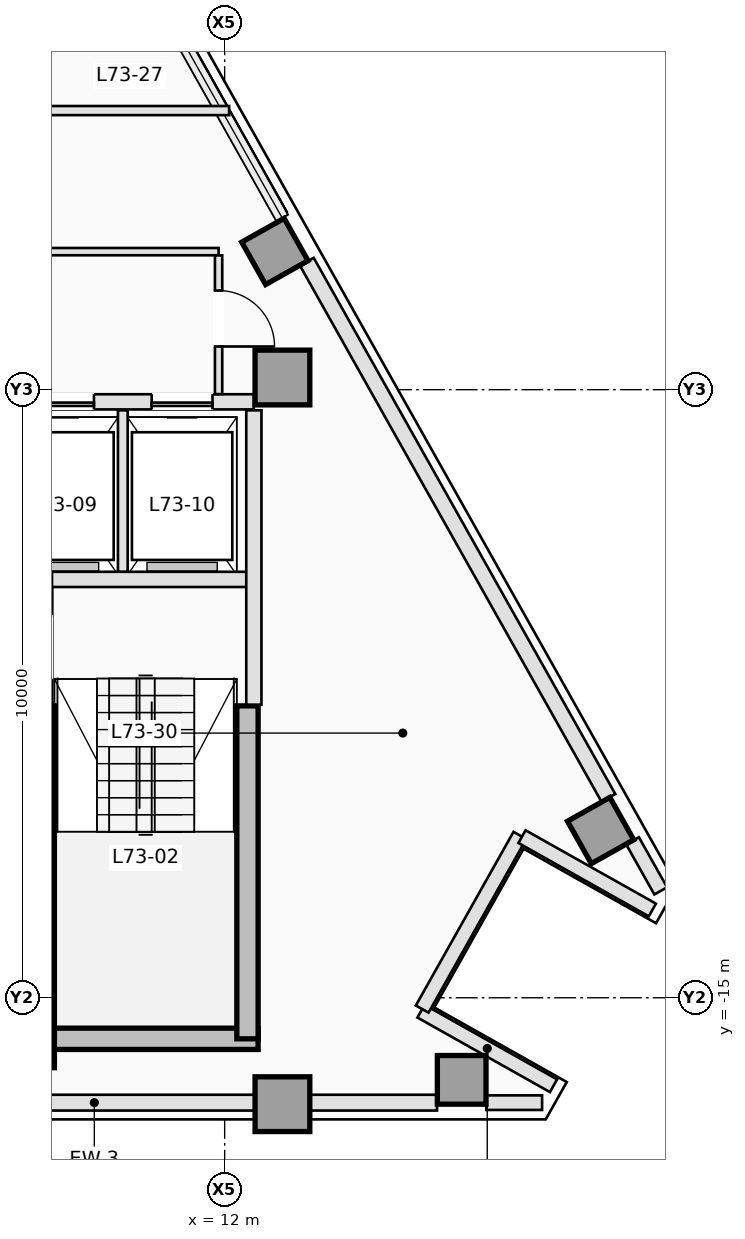
"""IFC4 building model, lengths in metres.
Left out: names, types, materials, properties, quantities, classifications, styles, units other than length and angle.
Written with IfcOpenShell. Run it as: python <this file> out.ifc"""

import sys

from ifc_helpers import new_model, si_unit, direction, frame, frame_2d, origin, origin_2d, place, context, subcontext, project, spatial, rectangle, extrude, element, fill, save


model = new_model("IFC4")
c1 = context("Model", 3, precision=1e-05, world=origin(), true_north=direction((0.0, 1.0)))
c2 = subcontext(c1, "Body", "Model", "MODEL_VIEW")
j1 = project(units=[si_unit("LENGTHUNIT", "METRE"), si_unit("PLANEANGLEUNIT", "RADIAN")], contexts=[c1])
p1 = place(None, origin())
s1 = spatial("IfcSite", under=j1, at=p1, CompositionType="ELEMENT")
p2 = place(p1, origin())
s2 = spatial("IfcBuilding", under=s1, at=p2, CompositionType="ELEMENT")
p3 = place(p2, frame((0.0, 0.0, 263.9)))
s3 = spatial("IfcBuildingStorey", under=s2, at=p3, CompositionType="ELEMENT", Elevation=263.9)
p4 = place(p3, frame((8.85, -15.675, 0.0), z_axis=(0.0, 0.0, 1.0), x_axis=(1.0, 0.0, 0.0)))
e1 = element("IfcWall", 1, at=p4, inside=s3, PredefinedType="SHEAR", context=c2, shape_type="SweptSolid", body=[
    extrude(rectangle(XDim=3.7, YDim=0.35, at=frame_2d((1.85, 0.0))), origin(), (0.0, 0.0, 1.0), 3.5),
])
p5 = place(p3, frame((12.375, -15.675, 0.0), z_axis=(0.0, 0.0, 1.0), x_axis=(0.0, 1.0, 0.0)))
e2 = element("IfcWall", 2, at=p5, inside=s3, PredefinedType="SHEAR", context=c2, shape_type="SweptSolid", body=[
    extrude(rectangle(XDim=5.475, YDim=0.35, at=frame_2d((2.738, 0.0))), origin(), (0.0, 0.0, 1.0), 3.5),
])
p6 = place(p3, frame((9.025, -16.15, 0.0), z_axis=(0.0, 0.0, 1.0), x_axis=(0.0, 1.0, 0.0)))
e3 = element("IfcWall", 3, at=p6, inside=s3, PredefinedType="SHEAR", context=c2, shape_type="SweptSolid", body=[
    extrude(rectangle(XDim=5.95, YDim=0.35, at=frame_2d((2.975, 0.0))), origin(), (0.0, 0.0, 1.0), 3.5),
])
for number, where, z_axis, x_axis in (
    (4, (12.95, -16.75, 0.0), (0.0, 0.0, 1.0), (1.0, 0.0, 0.0)),
    (5, (12.95, -4.8, 0.0), (0.0, 0.0, 1.0), (1.0, 0.0, 0.0)),
):
    element("IfcColumn", number, at=place(p3, frame(where, z_axis=z_axis, x_axis=x_axis)), inside=s3, PredefinedType="COLUMN", context=c2, shape_type="SweptSolid", body=[
        extrude(rectangle(XDim=0.9, YDim=0.9, at=origin_2d()), origin(), (0.0, 0.0, 1.0), 3.5),
    ])
for number, where, z_axis, x_axis in (
    (6, (15.898, -16.35, 0.0), (0.0, 0.0, 1.0), (0.0, 1.0, 0.0)),
    (7, (18.182, -12.25, 0.0), (0.0, 0.0, 1.0), (0.872, 0.49, 0.0)),
    (8, (12.825, -2.727, 0.0), (0.0, 0.0, 1.0), (0.872, 0.49, 0.0)),
):
    element("IfcColumn", number, at=place(p3, frame(where, z_axis=z_axis, x_axis=x_axis)), inside=s3, PredefinedType="COLUMN", context=c2, shape_type="SweptSolid", body=[
        extrude(rectangle(XDim=0.8, YDim=0.8, at=origin_2d()), origin(), (0.0, 0.0, 1.0), 3.5),
    ])
p7 = place(p3, frame((17.22, -16.725, 0.0), z_axis=(0.0, 0.0, 1.0), x_axis=(-1.0, 0.0, 0.0)))
e9 = element("IfcWall", 9, at=p7, inside=s3, PredefinedType="STANDARD", context=c2, shape_type="SweptSolid", body=[
    extrude(rectangle(XDim=0.917, YDim=0.24, at=frame_2d((0.459, 0.0))), origin(), (0.0, 0.0, 1.0), 3.25),
])
p8 = place(p3, frame((15.493, -16.725, 0.0), z_axis=(0.0, 0.0, 1.0), x_axis=(-1.0, 0.0, 0.0)))
e10 = element("IfcWall", 10, at=p8, inside=s3, PredefinedType="STANDARD", context=c2, shape_type="SweptSolid", body=[
    extrude(rectangle(XDim=11.273, YDim=0.26, at=frame_2d((5.636, 0.0))), origin(), (0.0, 0.0, 1.0), 2.79),
])
p9 = place(p3, frame((18.708, -12.419, 0.0), z_axis=(0.0, 0.0, 1.0), x_axis=(0.490199895283, -0.871610040479, 0.0)))
e11 = element("IfcWall", 11, at=p9, inside=s3, PredefinedType="STANDARD", context=c2, shape_type="SweptSolid", body=[
    extrude(rectangle(XDim=0.945, YDim=0.24, at=frame_2d((0.472, 0.0))), origin(), (0.0, 0.0, 1.0), 3.25),
])
p10 = place(p3, frame((13.351, -2.896, 0.0), z_axis=(0.0, 0.0, 1.0), x_axis=(0.490266968583, -0.871572314565, 0.0)))
e12 = element("IfcWall", 12, at=p10, inside=s3, PredefinedType="STANDARD", context=c2, shape_type="SweptSolid", body=[
    extrude(rectangle(XDim=10.116, YDim=0.26, at=frame_2d((5.058, 0.0))), origin(), (0.0, 0.0, 1.0), 3.25),
])
p11 = place(p3, frame((17.408, -16.447, 0.0), z_axis=(0.0, 0.0, 1.0), x_axis=(-0.871588577066, 0.490238056792, 0.0)))
e13 = element("IfcWall", 13, at=p11, inside=s3, PredefinedType="STANDARD", context=c2, shape_type="SweptSolid", body=[
    extrude(rectangle(XDim=2.5, YDim=0.24, at=frame_2d((1.25, 0.0))), origin(), (0.0, 0.0, 1.0), 3.25),
])
p12 = place(p3, frame((15.248, -15.186, 0.0), z_axis=(0.0, 0.0, 1.0), x_axis=(0.490293083368, 0.871557624258, 0.0)))
e14 = element("IfcWall", 14, at=p12, inside=s3, PredefinedType="STANDARD", context=c2, shape_type="SweptSolid", body=[
    extrude(rectangle(XDim=3.276, YDim=0.24, at=frame_2d((1.638, 0.0))), origin(), (0.0, 0.0, 1.0), 2.79),
])
p13 = place(p3, frame((16.889, -12.35, 0.0), z_axis=(0.0, 0.0, 1.0), x_axis=(0.87157023615, -0.490270663468, 0.0)))
e15 = element("IfcWall", 15, at=p13, inside=s3, PredefinedType="STANDARD", context=c2, shape_type="SweptSolid", body=[
    extrude(rectangle(XDim=2.46, YDim=0.24, at=frame_2d((1.23, 0.0))), origin(), (0.0, 0.0, 1.0), 3.25),
])
p14 = place(p3, frame((9.16, -8.12, 0.0), z_axis=(0.0, 0.0, 1.0), x_axis=(1.0, 0.0, 0.0)))
e16 = element("IfcWall", 16, at=p14, inside=s3, PredefinedType="PARTITIONING", context=c2, shape_type="SweptSolid", body=[
    extrude(rectangle(XDim=3.22, YDim=0.25, at=frame_2d((1.61, 0.0))), origin(), (0.0, 0.0, 1.0), 3.25),
])
p15 = place(p3, frame((12.48, -10.18, 0.0), z_axis=(0.0, 0.0, 1.0), x_axis=(0.0, 1.0, 0.0)))
e17 = element("IfcWall", 17, at=p15, inside=s3, PredefinedType="PARTITIONING", context=c2, shape_type="SweptSolid", body=[
    extrude(rectangle(XDim=4.84, YDim=0.25, at=frame_2d((2.42, 0.0))), origin(), (0.0, 0.0, 1.0), 3.25),
])
p16 = place(p3, frame((4.202, -5.2, 0.0), z_axis=(0.0, 0.0, 1.0), x_axis=(1.0, 0.0, 0.0)))
e18 = element("IfcWall", 18, at=p16, inside=s3, PredefinedType="PARTITIONING", context=c2, shape_type="SweptSolid", body=[
    extrude(rectangle(XDim=8.278, YDim=0.25, at=frame_2d((4.139, 0.0))), origin(), (0.0, 0.0, 1.0), 3.25),
])
p17 = place(p16, frame((0.748, 0.0, 0.0)))
e19 = element("IfcOpeningElement", 19, at=p17, cuts=e18, PredefinedType="OPENING", context=c2, shape_type="SweptSolid", body=[
    extrude(rectangle(XDim=1.0, YDim=2.15, at=frame_2d((0.5, 1.075))), frame((0.0, 0.135, 0.0), z_axis=(0.0, -1.0, 0.0), x_axis=(1.0, 0.0, 0.0)), (0.0, 0.0, 1.0), 0.27),
])
p18 = place(p16, frame((2.698, 0.0, 0.0)))
e20 = element("IfcOpeningElement", 20, at=p18, cuts=e18, PredefinedType="OPENING", context=c2, shape_type="SweptSolid", body=[
    extrude(rectangle(XDim=1.0, YDim=2.15, at=frame_2d((0.5, 1.075))), frame((0.0, 0.135, 0.0), z_axis=(0.0, -1.0, 0.0), x_axis=(1.0, 0.0, 0.0)), (0.0, 0.0, 1.0), 0.27),
])
p19 = place(p16, frame((4.648, 0.0, 0.0)))
e21 = element("IfcOpeningElement", 21, at=p19, cuts=e18, PredefinedType="OPENING", context=c2, shape_type="SweptSolid", body=[
    extrude(rectangle(XDim=1.0, YDim=2.15, at=frame_2d((0.5, 1.075))), frame((0.0, 0.135, 0.0), z_axis=(0.0, -1.0, 0.0), x_axis=(1.0, 0.0, 0.0)), (0.0, 0.0, 1.0), 0.27),
])
p20 = place(p16, frame((6.598, 0.0, 0.0)))
e22 = element("IfcOpeningElement", 22, at=p20, cuts=e18, PredefinedType="OPENING", context=c2, shape_type="SweptSolid", body=[
    extrude(rectangle(XDim=1.0, YDim=2.15, at=frame_2d((0.5, 1.075))), frame((0.0, 0.135, 0.0), z_axis=(0.0, -1.0, 0.0), x_axis=(1.0, 0.0, 0.0)), (0.0, 0.0, 1.0), 0.27),
])
p21 = place(p3, frame((10.325, -7.993, 0.0), z_axis=(0.0, 0.0, 1.0), x_axis=(0.0, 1.0, 0.0)))
e23 = element("IfcWall", 23, at=p21, inside=s3, PredefinedType="PARTITIONING", context=c2, shape_type="SweptSolid", body=[
    extrude(rectangle(XDim=2.653, YDim=0.16, at=frame_2d((1.326, 0.0))), origin(), (0.0, 0.0, 1.0), 3.25),
])
p22 = place(p3, frame((8.492, -2.73, 0.0), z_axis=(0.0, 0.0, 1.0), x_axis=(1.0, 0.0, 0.0)))
e24 = element("IfcWall", 24, at=p22, inside=s3, PredefinedType="PARTITIONING", context=c2, shape_type="SweptSolid", body=[
    extrude(rectangle(XDim=3.408, YDim=0.12, at=frame_2d((1.704, 0.0))), origin(), (0.0, 0.0, 1.0), 3.25),
])
p23 = place(p3, frame((11.9, -2.792, 0.0), z_axis=(0.0, 0.0, 1.0), x_axis=(0.0, -1.0, 0.0)))
e25 = element("IfcWall", 25, at=p23, inside=s3, PredefinedType="PARTITIONING", context=c2, shape_type="SweptSolid", body=[
    extrude(rectangle(XDim=2.281, YDim=0.12, at=frame_2d((1.141, 0.0))), origin(), (0.0, 0.0, 1.0), 3.25),
])
p24 = place(p23, frame((0.578, 0.0, 0.0)))
e26 = element("IfcOpeningElement", 26, at=p24, cuts=e25, PredefinedType="OPENING", context=c2, shape_type="SweptSolid", body=[
    extrude(rectangle(XDim=0.92, YDim=2.12, at=frame_2d((0.46, 1.06))), frame((0.0, 0.07, 0.0), z_axis=(0.0, -1.0, 0.0), x_axis=(1.0, 0.0, 0.0)), (0.0, 0.0, 1.0), 0.14),
])
p25 = place(p3, frame((12.073, -0.41, 0.0), z_axis=(0.0, 0.0, 1.0), x_axis=(-1.0, 0.0, 0.0)))
e27 = element("IfcWall", 27, at=p25, inside=s3, PredefinedType="PARTITIONING", context=c2, shape_type="SweptSolid", body=[
    extrude(rectangle(XDim=3.533, YDim=0.15, at=frame_2d((1.767, 0.0))), origin(), (0.0, 0.0, 1.0), 3.25),
])
p26 = place(p19, origin())
e28 = element("IfcDoor", 28, at=p26, inside=s3, OperationType="SLIDING_TO_RIGHT", PredefinedType="DOOR", context=c2, shape_type="SweptSolid", body=[
    extrude(rectangle(XDim=1.0, YDim=2.15, at=frame_2d((0.5, 1.075))), frame((0.0, 0.025, 0.0), z_axis=(0.0, -1.0, 0.0), x_axis=(1.0, 0.0, 0.0)), (0.0, 0.0, 1.0), 0.05),
])
fill(e21, e28)
p27 = place(p20, origin())
e29 = element("IfcDoor", 29, at=p27, inside=s3, OperationType="SLIDING_TO_RIGHT", PredefinedType="DOOR", context=c2, shape_type="SweptSolid", body=[
    extrude(rectangle(XDim=1.0, YDim=2.15, at=frame_2d((0.5, 1.075))), frame((0.0, 0.025, 0.0), z_axis=(0.0, -1.0, 0.0), x_axis=(1.0, 0.0, 0.0)), (0.0, 0.0, 1.0), 0.05),
])
fill(e22, e29)
p28 = place(p24, origin())
e30 = element("IfcDoor", 30, at=p28, inside=s3, OperationType="SINGLE_SWING_RIGHT", PredefinedType="DOOR", context=c2, shape_type="SweptSolid", body=[
    extrude(rectangle(XDim=0.92, YDim=2.12, at=frame_2d((0.46, 1.06))), frame((0.0, 0.025, 0.0), z_axis=(0.0, -1.0, 0.0), x_axis=(1.0, 0.0, 0.0)), (0.0, 0.0, 1.0), 0.05),
])
fill(e26, e30)
save(model, sys.argv[1])
